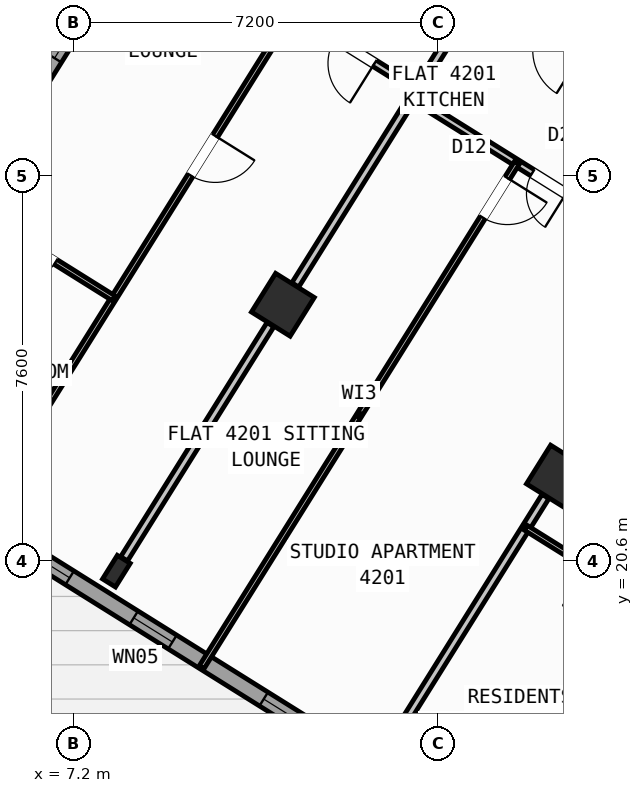
"""IFC4 building model, lengths in metres.
Left out: names, types, materials, properties, quantities, classifications, styles, units other than length and angle.
Written with IfcOpenShell. Run it as: python <this file> out.ifc"""

import sys

from ifc_helpers import new_model, si_unit, direction, frame, frame_2d, origin, origin_2d, place, context, subcontext, project, spatial, rectangle, hollow_rectangle, i_section, extrude, source, transform, mapped, element, fill, save


model = new_model("IFC4")
c1 = context("Model", 3, precision=1e-05, world=origin(), true_north=direction((0.0, 1.0)))
c2 = subcontext(c1, "Body", "Model", "MODEL_VIEW")
j1 = project(units=[si_unit("LENGTHUNIT", "METRE"), si_unit("PLANEANGLEUNIT", "RADIAN")], contexts=[c1])
p1 = place(None, origin())
s1 = spatial("IfcSite", under=j1, at=p1, CompositionType="ELEMENT")
p2 = place(p1, origin())
s2 = spatial("IfcBuilding", under=s1, at=p2, CompositionType="ELEMENT")
p3 = place(p2, frame((0.0, 0.0, 165.9)))
s3 = spatial("IfcBuildingStorey", under=s2, at=p3, CompositionType="ELEMENT", Elevation=165.9)
m1 = source(origin(), c2, "Body", "SweptSolid", [
    extrude(hollow_rectangle(XDim=0.9, YDim=0.9, WallThickness=0.036, at=origin_2d()), origin(), (0.0, 0.0, 1.0), 3.6),
])
for number, where, z_axis, x_axis in (
    (1, (16.764, 22.261, 0.0), (0.0, 0.0, 1.0), (-0.848, 0.53, 0.0)),
    (2, (11.336, 25.653, 0.0), (0.0, 0.0, 1.0), (-0.848, 0.53, 0.0)),
):
    element("IfcColumn", number, at=place(p3, frame(where, z_axis=z_axis, x_axis=x_axis)), inside=s3, PredefinedType="COLUMN", context=c2, shape_type="MappedRepresentation", body=[
        mapped(m1, transform((0.0, 0.0, 0.0), scale=1.0)),
    ])
m2 = source(origin(), c2, "Body", "SweptSolid", [
    extrude(i_section(OverallWidth=0.3, OverallDepth=0.55, WebThickness=0.015, FlangeThickness=0.029, at=origin_2d()), origin(), (0.0, 0.0, 1.0), 3.6),
])
p4 = place(p3, frame((8.051, 20.395, 0.0), z_axis=(0.0, 0.0, 1.0), x_axis=(-0.848048096156, 0.529919264233, 0.0)))
e3 = element("IfcColumn", 3, at=p4, inside=s3, PredefinedType="COLUMN", context=c2, shape_type="MappedRepresentation", body=[
    mapped(m2, transform((0.0, 0.0, 0.0), scale=1.0)),
])
p5 = place(p3, frame((29.268, 6.429, 0.0), z_axis=(0.0, 0.0, 1.0), x_axis=(-0.848049971435, 0.529916263149, 0.0)))
e4 = element("IfcWall", 4, at=p5, inside=s3, PredefinedType="STANDARD", context=c2, shape_type="SweptSolid", body=[
    extrude(rectangle(XDim=31.588, YDim=0.32, at=frame_2d((15.794, 0.0))), origin(), (0.0, 0.0, 1.0), 3.32),
])
p6 = place(p5, frame((16.362, 0.0, 0.0)))
e5 = element("IfcOpeningElement", 5, at=p6, cuts=e4, PredefinedType="OPENING", context=c2, shape_type="SweptSolid", body=[
    extrude(rectangle(XDim=1.2, YDim=2.15, at=frame_2d((0.6, 1.075))), frame((0.0, 0.17, 0.0), z_axis=(0.0, -1.0, 0.0), x_axis=(1.0, 0.0, 0.0)), (0.0, 0.0, 1.0), 0.34),
])
p7 = place(p5, frame((2.989, 0.0, 0.8)))
e6 = element("IfcOpeningElement", 6, at=p7, cuts=e4, PredefinedType="OPENING", context=c2, shape_type="SweptSolid", body=[
    extrude(rectangle(XDim=2.1, YDim=1.55, at=frame_2d((1.05, 0.775))), frame((0.0, 0.17, 0.0), z_axis=(0.0, -1.0, 0.0), x_axis=(1.0, 0.0, 0.0)), (0.0, 0.0, 1.0), 0.34),
])
p8 = place(p5, frame((8.359, 0.0, 0.8)))
e7 = element("IfcOpeningElement", 7, at=p8, cuts=e4, PredefinedType="OPENING", context=c2, shape_type="SweptSolid", body=[
    extrude(rectangle(XDim=2.1, YDim=1.55, at=frame_2d((1.05, 0.775))), frame((0.0, 0.17, 0.0), z_axis=(0.0, -1.0, 0.0), x_axis=(1.0, 0.0, 0.0)), (0.0, 0.0, 1.0), 0.34),
])
p9 = place(p5, frame((13.284, 0.0, 0.95)))
e8 = element("IfcOpeningElement", 8, at=p9, cuts=e4, PredefinedType="OPENING", context=c2, shape_type="SweptSolid", body=[
    extrude(rectangle(XDim=1.2, YDim=1.4, at=frame_2d((0.6, 0.7))), frame((0.0, 0.17, 0.0), z_axis=(0.0, -1.0, 0.0), x_axis=(1.0, 0.0, 0.0)), (0.0, 0.0, 1.0), 0.34),
])
p10 = place(p5, frame((20.39, 0.0, 0.95)))
e9 = element("IfcOpeningElement", 9, at=p10, cuts=e4, PredefinedType="OPENING", context=c2, shape_type="SweptSolid", body=[
    extrude(rectangle(XDim=1.2, YDim=1.4, at=frame_2d((0.6, 0.7))), frame((0.0, 0.17, 0.0), z_axis=(0.0, -1.0, 0.0), x_axis=(1.0, 0.0, 0.0)), (0.0, 0.0, 1.0), 0.34),
])
p11 = place(p5, frame((23.715, 0.0, 1.0)))
e10 = element("IfcOpeningElement", 10, at=p11, cuts=e4, PredefinedType="OPENING", context=c2, shape_type="SweptSolid", body=[
    extrude(rectangle(XDim=0.9, YDim=1.25, at=frame_2d((0.45, 0.625))), frame((0.0, 0.17, 0.0), z_axis=(0.0, -1.0, 0.0), x_axis=(1.0, 0.0, 0.0)), (0.0, 0.0, 1.0), 0.34),
])
p12 = place(p5, frame((26.106, 0.0, 0.85)))
e11 = element("IfcOpeningElement", 11, at=p12, cuts=e4, PredefinedType="OPENING", context=c2, shape_type="SweptSolid", body=[
    extrude(rectangle(XDim=1.5, YDim=1.5, at=frame_2d((0.75, 0.75))), frame((0.0, 0.17, 0.0), z_axis=(0.0, -1.0, 0.0), x_axis=(1.0, 0.0, 0.0)), (0.0, 0.0, 1.0), 0.34),
])
p13 = place(p5, frame((29.068, 0.0, 0.85)))
e12 = element("IfcOpeningElement", 12, at=p13, cuts=e4, PredefinedType="OPENING", context=c2, shape_type="SweptSolid", body=[
    extrude(rectangle(XDim=1.8, YDim=1.5, at=frame_2d((0.9, 0.75))), frame((0.0, 0.17, 0.0), z_axis=(0.0, -1.0, 0.0), x_axis=(1.0, 0.0, 0.0)), (0.0, 0.0, 1.0), 0.34),
])
p14 = place(p3, frame((2.415, 23.452, 0.0), z_axis=(0.0, 0.0, 1.0), x_axis=(0.52991049553, 0.848053575387, 0.0)))
e13 = element("IfcWall", 13, at=p14, inside=s3, PredefinedType="STANDARD", context=c2, shape_type="SweptSolid", body=[
    extrude(rectangle(XDim=21.587, YDim=0.32, at=frame_2d((10.794, 0.0))), origin(), (0.0, 0.0, 1.0), 2.795),
])
p15 = place(p14, frame((1.673, 0.0, 0.8)))
e14 = element("IfcOpeningElement", 14, at=p15, cuts=e13, PredefinedType="OPENING", context=c2, shape_type="SweptSolid", body=[
    extrude(rectangle(XDim=2.1, YDim=1.55, at=frame_2d((1.05, 0.775))), frame((0.0, 0.17, 0.0), z_axis=(0.0, -1.0, 0.0), x_axis=(1.0, 0.0, 0.0)), (0.0, 0.0, 1.0), 0.34),
])
p16 = place(p14, frame((8.334, 0.0, 0.85)))
e15 = element("IfcOpeningElement", 15, at=p16, cuts=e13, PredefinedType="OPENING", context=c2, shape_type="SweptSolid", body=[
    extrude(rectangle(XDim=1.8, YDim=1.5, at=frame_2d((0.9, 0.75))), frame((0.0, 0.17, 0.0), z_axis=(0.0, -1.0, 0.0), x_axis=(1.0, 0.0, 0.0)), (0.0, 0.0, 1.0), 0.34),
])
p17 = place(p14, frame((17.172, 0.0, 0.85)))
e16 = element("IfcOpeningElement", 16, at=p17, cuts=e13, PredefinedType="OPENING", context=c2, shape_type="SweptSolid", body=[
    extrude(rectangle(XDim=1.5, YDim=1.5, at=frame_2d((0.75, 0.75))), frame((0.0, 0.17, 0.0), z_axis=(0.0, -1.0, 0.0), x_axis=(1.0, 0.0, 0.0)), (0.0, 0.0, 1.0), 0.34),
])
p18 = place(p3, frame((14.138, 41.825, 0.0), z_axis=(0.0, 0.0, 1.0), x_axis=(0.848046498049, -0.529921821731, 0.0)))
e17 = element("IfcWall", 17, at=p18, inside=s3, PredefinedType="STANDARD", context=c2, shape_type="SweptSolid", body=[
    extrude(rectangle(XDim=31.588, YDim=0.32, at=frame_2d((15.794, 0.0))), origin(), (0.0, 0.0, 1.0), 3.32),
])
p19 = place(p18, frame((3.253, 0.0, 0.0)))
e18 = element("IfcOpeningElement", 18, at=p19, cuts=e17, PredefinedType="OPENING", context=c2, shape_type="SweptSolid", body=[
    extrude(rectangle(XDim=1.05, YDim=2.15, at=frame_2d((0.525, 1.075))), frame((0.0, 0.17, 0.0), z_axis=(0.0, -1.0, 0.0), x_axis=(1.0, 0.0, 0.0)), (0.0, 0.0, 1.0), 0.34),
])
p20 = place(p18, frame((0.863, 0.0, 0.85)))
e19 = element("IfcOpeningElement", 19, at=p20, cuts=e17, PredefinedType="OPENING", context=c2, shape_type="SweptSolid", body=[
    extrude(rectangle(XDim=1.8, YDim=1.5, at=frame_2d((0.9, 0.75))), frame((0.0, 0.17, 0.0), z_axis=(0.0, -1.0, 0.0), x_axis=(1.0, 0.0, 0.0)), (0.0, 0.0, 1.0), 0.34),
])
p21 = place(p18, frame((8.494, 0.0, 0.85)))
e20 = element("IfcOpeningElement", 20, at=p21, cuts=e17, PredefinedType="OPENING", context=c2, shape_type="SweptSolid", body=[
    extrude(rectangle(XDim=1.8, YDim=1.5, at=frame_2d((0.9, 0.75))), frame((0.0, 0.17, 0.0), z_axis=(0.0, -1.0, 0.0), x_axis=(1.0, 0.0, 0.0)), (0.0, 0.0, 1.0), 0.34),
])
p22 = place(p18, frame((13.874, 0.0, 0.85)))
e21 = element("IfcOpeningElement", 21, at=p22, cuts=e17, PredefinedType="OPENING", context=c2, shape_type="SweptSolid", body=[
    extrude(rectangle(XDim=1.5, YDim=1.5, at=frame_2d((0.75, 0.75))), frame((0.0, 0.17, 0.0), z_axis=(0.0, -1.0, 0.0), x_axis=(1.0, 0.0, 0.0)), (0.0, 0.0, 1.0), 0.34),
])
p23 = place(p18, frame((17.104, 0.0, 1.0)))
e22 = element("IfcOpeningElement", 22, at=p23, cuts=e17, PredefinedType="OPENING", context=c2, shape_type="SweptSolid", body=[
    extrude(rectangle(XDim=0.9, YDim=1.25, at=frame_2d((0.45, 0.625))), frame((0.0, 0.17, 0.0), z_axis=(0.0, -1.0, 0.0), x_axis=(1.0, 0.0, 0.0)), (0.0, 0.0, 1.0), 0.34),
])
p24 = place(p18, frame((22.144, 0.0, 1.0)))
e23 = element("IfcOpeningElement", 23, at=p24, cuts=e17, PredefinedType="OPENING", context=c2, shape_type="SweptSolid", body=[
    extrude(rectangle(XDim=0.9, YDim=1.25, at=frame_2d((0.45, 0.625))), frame((0.0, 0.17, 0.0), z_axis=(0.0, -1.0, 0.0), x_axis=(1.0, 0.0, 0.0)), (0.0, 0.0, 1.0), 0.34),
])
p25 = place(p18, frame((27.744, 0.0, 1.0)))
e24 = element("IfcOpeningElement", 24, at=p25, cuts=e17, PredefinedType="OPENING", context=c2, shape_type="SweptSolid", body=[
    extrude(rectangle(XDim=0.9, YDim=1.25, at=frame_2d((0.45, 0.625))), frame((0.0, 0.17, 0.0), z_axis=(0.0, -1.0, 0.0), x_axis=(1.0, 0.0, 0.0)), (0.0, 0.0, 1.0), 0.34),
])
p26 = place(p3, frame((23.899, 26.529, 0.0), z_axis=(0.0, 0.0, 1.0), x_axis=(-0.529917716469, -0.848049063305, 0.0)))
e25 = element("IfcWall", 25, at=p26, inside=s3, PredefinedType="PARTITIONING", context=c2, shape_type="SweptSolid", body=[
    extrude(rectangle(XDim=14.05, YDim=0.16, at=frame_2d((7.025, 0.0))), origin(), (0.0, 0.0, 1.0), 3.31),
])
p27 = place(p3, frame((25.065, 28.394, 0.0), z_axis=(0.0, 0.0, 1.0), x_axis=(-0.848048310262, 0.529918921593, 0.0)))
e26 = element("IfcWall", 26, at=p27, inside=s3, PredefinedType="PARTITIONING", context=c2, shape_type="SweptSolid", body=[
    extrude(rectangle(XDim=16.73, YDim=0.16, at=frame_2d((8.365, 0.0))), origin(), (0.0, 0.0, 1.0), 3.31),
])
p28 = place(p27, frame((2.22, 0.0, 0.0)))
e27 = element("IfcOpeningElement", 27, at=p28, cuts=e26, PredefinedType="OPENING", context=c2, shape_type="SweptSolid", body=[
    extrude(rectangle(XDim=0.86, YDim=2.05, at=frame_2d((0.43, 1.025))), frame((0.0, 0.09, 0.0), z_axis=(0.0, -1.0, 0.0), x_axis=(1.0, 0.0, 0.0)), (0.0, 0.0, 1.0), 0.18),
])
p29 = place(p27, frame((7.82, 0.0, 0.0)))
e28 = element("IfcOpeningElement", 28, at=p29, cuts=e26, PredefinedType="OPENING", context=c2, shape_type="SweptSolid", body=[
    extrude(rectangle(XDim=1.0, YDim=2.1, at=frame_2d((0.5, 1.05))), frame((0.0, 0.09, 0.0), z_axis=(0.0, -1.0, 0.0), x_axis=(1.0, 0.0, 0.0)), (0.0, 0.0, 1.0), 0.18),
])
p30 = place(p27, frame((12.95, 0.0, 0.0)))
e29 = element("IfcOpeningElement", 29, at=p30, cuts=e26, PredefinedType="OPENING", context=c2, shape_type="SweptSolid", body=[
    extrude(rectangle(XDim=1.0, YDim=2.1, at=frame_2d((0.5, 1.05))), frame((0.0, 0.09, 0.0), z_axis=(0.0, -1.0, 0.0), x_axis=(1.0, 0.0, 0.0)), (0.0, 0.0, 1.0), 0.18),
])
p31 = place(p3, frame((20.293, 28.782, 0.0), z_axis=(0.0, 0.0, 1.0), x_axis=(-0.848040881926, 0.529930809241, 0.0)))
e30 = element("IfcWall", 30, at=p31, inside=s3, PredefinedType="PARTITIONING", context=c2, shape_type="SweptSolid", body=[
    extrude(rectangle(XDim=5.476, YDim=0.16, at=frame_2d((2.738, 0.0))), origin(), (0.0, 0.0, 1.0), 2.795),
])
p32 = place(p31, frame((3.568, 0.0, 0.0)))
e31 = element("IfcOpeningElement", 31, at=p32, cuts=e30, PredefinedType="OPENING", context=c2, shape_type="SweptSolid", body=[
    extrude(rectangle(XDim=1.0, YDim=2.1, at=frame_2d((0.5, 1.05))), frame((0.0, 0.09, 0.0), z_axis=(0.0, -1.0, 0.0), x_axis=(1.0, 0.0, 0.0)), (0.0, 0.0, 1.0), 0.18),
])
p33 = place(p3, frame((16.519, 21.87, 0.0), z_axis=(0.0, 0.0, 1.0), x_axis=(-0.529922447305, -0.848046107144, 0.0)))
e32 = element("IfcWall", 32, at=p33, inside=s3, PredefinedType="PARTITIONING", context=c2, shape_type="SweptSolid", body=[
    extrude(rectangle(XDim=5.451, YDim=0.16, at=frame_2d((2.726, 0.0))), origin(), (0.0, 0.0, 1.0), 2.795),
])
p34 = place(p3, frame((19.346, 19.242, 0.0), z_axis=(0.0, 0.0, 1.0), x_axis=(-0.848059820872, 0.529900500304, 0.0)))
e33 = element("IfcWall", 33, at=p34, inside=s3, PredefinedType="PARTITIONING", context=c2, shape_type="SweptSolid", body=[
    extrude(rectangle(XDim=3.79, YDim=0.11, at=frame_2d((1.895, 0.0))), origin(), (0.0, 0.0, 1.0), 3.31),
])
p35 = place(p34, frame((1.435, 0.0, 0.0)))
e34 = element("IfcOpeningElement", 34, at=p35, cuts=e33, PredefinedType="OPENING", context=c2, shape_type="SweptSolid", body=[
    extrude(rectangle(XDim=0.92, YDim=2.08, at=frame_2d((0.46, 1.04))), frame((0.0, 0.065, 0.0), z_axis=(0.0, -1.0, 0.0), x_axis=(1.0, 0.0, 0.0)), (0.0, 0.0, 1.0), 0.13),
])
p36 = place(p3, frame((14.96, 31.452, 0.0), z_axis=(0.0, 0.0, 1.0), x_axis=(-0.529947310719, -0.848030570122, 0.0)))
e35 = element("IfcWall", 35, at=p36, inside=s3, PredefinedType="PARTITIONING", context=c2, shape_type="SweptSolid", body=[
    extrude(rectangle(XDim=6.376, YDim=0.16, at=frame_2d((3.188, 0.0))), origin(), (0.0, 0.0, 1.0), 2.795),
])
p37 = place(p3, frame((11.091, 25.261, 0.0), z_axis=(0.0, 0.0, 1.0), x_axis=(-0.52994257524, -0.848033529377, 0.0)))
e36 = element("IfcWall", 36, at=p37, inside=s3, PredefinedType="PARTITIONING", context=c2, shape_type="SweptSolid", body=[
    extrude(rectangle(XDim=5.451, YDim=0.16, at=frame_2d((2.726, 0.0))), origin(), (0.0, 0.0, 1.0), 2.795),
])
p38 = place(p3, frame((19.318, 26.349, 0.0), z_axis=(0.0, 0.0, 1.0), x_axis=(-0.848039019877, 0.529933789039, 0.0)))
e37 = element("IfcWall", 37, at=p38, inside=s3, PredefinedType="PLUMBINGWALL", context=c2, shape_type="SweptSolid", body=[
    extrude(rectangle(XDim=6.4, YDim=0.14, at=frame_2d((3.2, 0.0))), origin(), (0.0, 0.0, 1.0), 3.31),
])
p39 = place(p38, frame((2.824, 0.0, 0.0)))
e38 = element("IfcOpeningElement", 38, at=p39, cuts=e37, PredefinedType="OPENING", context=c2, shape_type="SweptSolid", body=[
    extrude(rectangle(XDim=0.78, YDim=2.05, at=frame_2d((0.39, 1.025))), frame((0.0, 0.08, 0.0), z_axis=(0.0, -1.0, 0.0), x_axis=(1.0, 0.0, 0.0)), (0.0, 0.0, 1.0), 0.16),
])
p40 = place(p3, frame((15.953, 28.452, 0.0), z_axis=(0.0, 0.0, 1.0), x_axis=(-0.529931645041, -0.848040359643, 0.0)))
e39 = element("IfcWall", 39, at=p40, inside=s3, PredefinedType="PARTITIONING", context=c2, shape_type="SweptSolid", body=[
    extrude(rectangle(XDim=11.74, YDim=0.11, at=frame_2d((5.87, 0.0))), origin(), (0.0, 0.0, 1.0), 3.31),
])
p41 = place(p40, frame((0.35, 0.0, 0.0)))
e40 = element("IfcOpeningElement", 40, at=p41, cuts=e39, PredefinedType="OPENING", context=c2, shape_type="SweptSolid", body=[
    extrude(rectangle(XDim=0.92, YDim=2.08, at=frame_2d((0.46, 1.04))), frame((0.0, 0.065, 0.0), z_axis=(0.0, -1.0, 0.0), x_axis=(1.0, 0.0, 0.0)), (0.0, 0.0, 1.0), 0.13),
])
p42 = place(p3, frame((12.798, 33.465, 0.0), z_axis=(0.0, 0.0, 1.0), x_axis=(-0.529916182913, -0.848050021571, 0.0)))
e41 = element("IfcWall", 41, at=p42, inside=s3, PredefinedType="PARTITIONING", context=c2, shape_type="SweptSolid", body=[
    extrude(rectangle(XDim=14.32, YDim=0.11, at=frame_2d((7.16, 0.0))), origin(), (0.0, 0.0, 1.0), 3.31),
])
p43 = place(p42, frame((0.76, 0.0, 0.0)))
e42 = element("IfcOpeningElement", 42, at=p43, cuts=e41, PredefinedType="OPENING", context=c2, shape_type="SweptSolid", body=[
    extrude(rectangle(XDim=0.78, YDim=2.05, at=frame_2d((0.39, 1.025))), frame((0.0, 0.065, 0.0), z_axis=(0.0, -1.0, 0.0), x_axis=(1.0, 0.0, 0.0)), (0.0, 0.0, 1.0), 0.13),
])
p44 = place(p42, frame((5.281, 0.0, 0.0)))
e43 = element("IfcOpeningElement", 43, at=p44, cuts=e41, PredefinedType="OPENING", context=c2, shape_type="SweptSolid", body=[
    extrude(rectangle(XDim=0.92, YDim=2.08, at=frame_2d((0.46, 1.04))), frame((0.0, 0.065, 0.0), z_axis=(0.0, -1.0, 0.0), x_axis=(1.0, 0.0, 0.0)), (0.0, 0.0, 1.0), 0.13),
])
p45 = place(p3, frame((13.986, 29.893, 0.0), z_axis=(0.0, 0.0, 1.0), x_axis=(-0.84802195137, 0.529961102341, 0.0)))
e44 = element("IfcWall", 44, at=p45, inside=s3, PredefinedType="PLUMBINGWALL", context=c2, shape_type="SweptSolid", body=[
    extrude(rectangle(XDim=2.9, YDim=0.14, at=frame_2d((1.45, 0.0))), origin(), (0.0, 0.0, 1.0), 3.31),
])
p46 = place(p45, frame((0.99, 0.0, 0.0)))
e45 = element("IfcOpeningElement", 45, at=p46, cuts=e44, PredefinedType="OPENING", context=c2, shape_type="SweptSolid", body=[
    extrude(rectangle(XDim=0.92, YDim=2.08, at=frame_2d((0.46, 1.04))), frame((0.0, 0.08, 0.0), z_axis=(0.0, -1.0, 0.0), x_axis=(1.0, 0.0, 0.0)), (0.0, 0.0, 1.0), 0.16),
])
p47 = place(p3, frame((7.997, 25.781, 0.0), z_axis=(0.0, 0.0, 1.0), x_axis=(-0.848051346257, 0.52991406295, 0.0)))
e46 = element("IfcWall", 46, at=p47, inside=s3, PredefinedType="PARTITIONING", context=c2, shape_type="SweptSolid", body=[
    extrude(rectangle(XDim=3.62, YDim=0.11, at=frame_2d((1.81, 0.0))), origin(), (0.0, 0.0, 1.0), 3.31),
])
p48 = place(p47, frame((1.35, 0.0, 0.0)))
e47 = element("IfcOpeningElement", 47, at=p48, cuts=e46, PredefinedType="OPENING", context=c2, shape_type="SweptSolid", body=[
    extrude(rectangle(XDim=0.92, YDim=2.08, at=frame_2d((0.46, 1.04))), frame((0.0, 0.065, 0.0), z_axis=(0.0, -1.0, 0.0), x_axis=(1.0, 0.0, 0.0)), (0.0, 0.0, 1.0), 0.13),
])
m3 = source(origin(), c2, "Body", "SweptSolid", [
    extrude(rectangle(XDim=1.2, YDim=1.4, at=frame_2d((0.6, 0.7))), frame((0.0, 0.03, 0.0), z_axis=(0.0, -1.0, 0.0), x_axis=(1.0, 0.0, 0.0)), (0.0, 0.0, 1.0), 0.06),
])
p49 = place(p10, origin())
e48 = element("IfcWindow", 48, at=p49, inside=s3, PartitioningType="SINGLE_PANEL", PredefinedType="WINDOW", context=c2, shape_type="MappedRepresentation", body=[
    mapped(m3, transform((0.0, 0.0, 0.0), scale=1.0)),
])
fill(e9, e48)
m4 = source(origin(), c2, "Body", "SweptSolid", [
    extrude(rectangle(XDim=0.9, YDim=1.25, at=frame_2d((0.45, 0.625))), frame((0.0, 0.03, 0.0), z_axis=(0.0, -1.0, 0.0), x_axis=(1.0, 0.0, 0.0)), (0.0, 0.0, 1.0), 0.06),
])
p50 = place(p11, origin())
e49 = element("IfcWindow", 49, at=p50, inside=s3, PartitioningType="SINGLE_PANEL", PredefinedType="WINDOW", context=c2, shape_type="MappedRepresentation", body=[
    mapped(m4, transform((0.0, 0.0, 0.0), scale=1.0)),
])
fill(e10, e49)
m5 = source(origin(), c2, "Body", "SweptSolid", [
    extrude(rectangle(XDim=1.5, YDim=1.5, at=frame_2d((0.75, 0.75))), frame((0.0, 0.03, 0.0), z_axis=(0.0, -1.0, 0.0), x_axis=(1.0, 0.0, 0.0)), (0.0, 0.0, 1.0), 0.06),
])
p51 = place(p12, origin())
e50 = element("IfcWindow", 50, at=p51, inside=s3, PartitioningType="SINGLE_PANEL", PredefinedType="WINDOW", context=c2, shape_type="MappedRepresentation", body=[
    mapped(m5, transform((0.0, 0.0, 0.0), scale=1.0)),
])
fill(e11, e50)
m6 = source(origin(), c2, "Body", "SweptSolid", [
    extrude(rectangle(XDim=1.8, YDim=1.5, at=frame_2d((0.9, 0.75))), frame((0.0, 0.03, 0.0), z_axis=(0.0, -1.0, 0.0), x_axis=(1.0, 0.0, 0.0)), (0.0, 0.0, 1.0), 0.06),
])
p52 = place(p16, origin())
e51 = element("IfcWindow", 51, at=p52, inside=s3, PartitioningType="SINGLE_PANEL", PredefinedType="WINDOW", context=c2, shape_type="MappedRepresentation", body=[
    mapped(m6, transform((0.0, 0.0, 0.0), scale=1.0)),
])
fill(e15, e51)
m7 = source(origin(), c2, "Body", "SweptSolid", [
    extrude(rectangle(XDim=0.92, YDim=2.08, at=frame_2d((0.46, 1.04))), frame((0.0, 0.025, 0.0), z_axis=(0.0, -1.0, 0.0), x_axis=(1.0, 0.0, 0.0)), (0.0, 0.0, 1.0), 0.05),
])
p53 = place(p41, origin())
e52 = element("IfcDoor", 52, at=p53, inside=s3, OperationType="SINGLE_SWING_LEFT", PredefinedType="DOOR", context=c2, shape_type="MappedRepresentation", body=[
    mapped(m7, transform((0.0, 0.0, 0.0), scale=1.0)),
])
fill(e40, e52)
m8 = source(origin(), c2, "Body", "SweptSolid", [
    extrude(rectangle(XDim=0.78, YDim=2.05, at=frame_2d((0.39, 1.025))), frame((0.0, 0.025, 0.0), z_axis=(0.0, -1.0, 0.0), x_axis=(1.0, 0.0, 0.0)), (0.0, 0.0, 1.0), 0.05),
])
p54 = place(p39, origin())
e53 = element("IfcDoor", 53, at=p54, inside=s3, OperationType="SINGLE_SWING_LEFT", PredefinedType="DOOR", context=c2, shape_type="MappedRepresentation", body=[
    mapped(m8, transform((0.0, 0.0, 0.0), scale=1.0)),
])
fill(e38, e53)
p55 = place(p46, origin())
e54 = element("IfcDoor", 54, at=p55, inside=s3, OperationType="SINGLE_SWING_LEFT", PredefinedType="DOOR", context=c2, shape_type="MappedRepresentation", body=[
    mapped(m7, transform((0.0, 0.0, 0.0), scale=1.0)),
])
fill(e45, e54)
p56 = place(p44, origin())
e55 = element("IfcDoor", 55, at=p56, inside=s3, OperationType="SINGLE_SWING_LEFT", PredefinedType="DOOR", context=c2, shape_type="MappedRepresentation", body=[
    mapped(m7, transform((0.0, 0.0, 0.0), scale=1.0)),
])
fill(e43, e55)
p57 = place(p48, origin())
e56 = element("IfcDoor", 56, at=p57, inside=s3, OperationType="SINGLE_SWING_RIGHT", PredefinedType="DOOR", context=c2, shape_type="MappedRepresentation", body=[
    mapped(m7, transform((0.0, 0.0, 0.0), scale=1.0)),
])
fill(e47, e56)
save(model, sys.argv[1])
